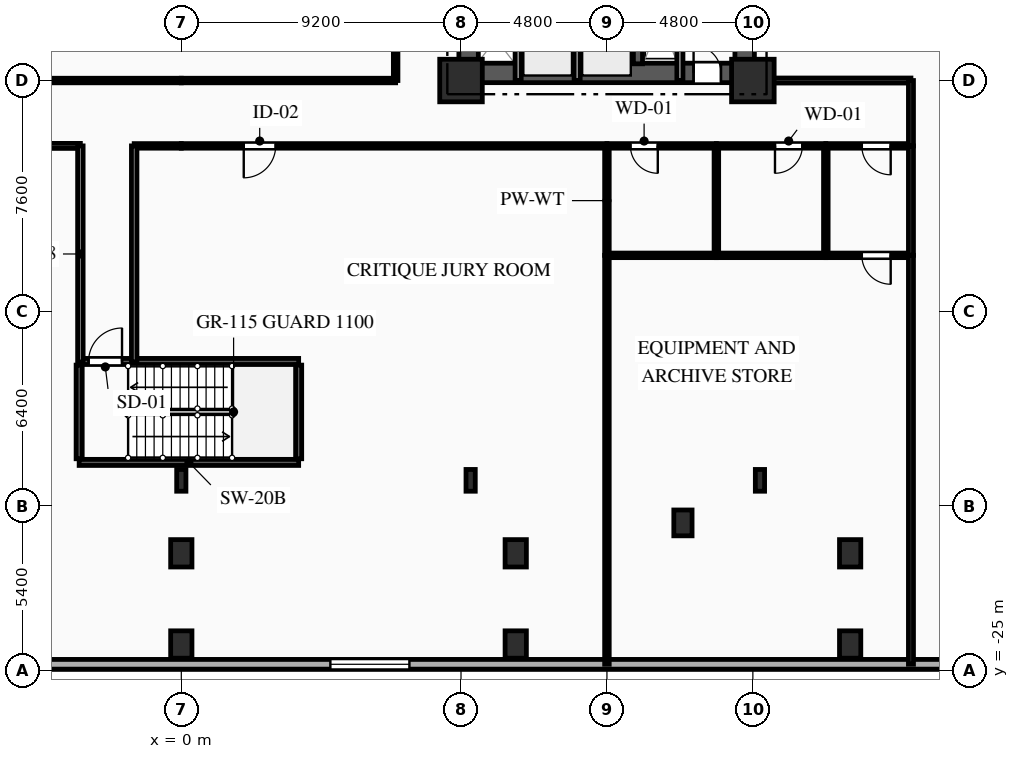
"""IFC4 building model, lengths in metres.
Left out: names, types, materials, properties, quantities, classifications, styles, units other than length and angle.
Written with IfcOpenShell. Run it as: python <this file> out.ifc"""

import sys

from ifc_helpers import new_model, si_unit, direction, frame, frame_2d, origin, origin_2d, place, context, subcontext, project, spatial, rectangle, i_section, extrude, element, fill, save


model = new_model("IFC4")
c1 = context("Model", 3, precision=1e-05, world=origin(), true_north=direction((0.0, 1.0)))
c2 = subcontext(c1, "Body", "Model", "MODEL_VIEW")
j1 = project(units=[si_unit("LENGTHUNIT", "METRE"), si_unit("PLANEANGLEUNIT", "RADIAN")], contexts=[c1])
p1 = place(None, origin())
s1 = spatial("IfcSite", under=j1, at=p1, CompositionType="ELEMENT")
p2 = place(p1, origin())
s2 = spatial("IfcBuilding", under=s1, at=p2, CompositionType="ELEMENT")
p3 = place(p2, frame((0.0, 0.0, 9.0)))
s3 = spatial("IfcBuildingStorey", under=s2, at=p3, CompositionType="ELEMENT", Elevation=9.0)
for number, where, z_axis, x_axis in (
    (1, (9.2, -5.6, 0.0), (0.0, 0.0, 1.0), (1.0, 0.0, 0.0)),
    (2, (18.8, -5.6, 0.0), (0.0, 0.0, 1.0), (1.0, 0.0, 0.0)),
):
    element("IfcColumn", number, at=place(p3, frame(where, z_axis=z_axis, x_axis=x_axis)), inside=s3, PredefinedType="COLUMN", context=c2, shape_type="SweptSolid", body=[
        extrude(rectangle(XDim=1.4, YDim=1.4, at=origin_2d()), origin(), (0.0, 0.0, 1.0), 4.5),
    ])
for number, where, z_axis, x_axis in (
    (3, (0.0, -21.15, 0.0), (0.0, 0.0, 1.0), (1.0, 0.0, 0.0)),
    (4, (11.0, -21.15, 0.0), (0.0, 0.0, 1.0), (1.0, 0.0, 0.0)),
    (5, (22.0, -21.15, 0.0), (0.0, 0.0, 1.0), (1.0, 0.0, 0.0)),
    (6, (0.0, -24.15, 0.0), (0.0, 0.0, 1.0), (1.0, 0.0, 0.0)),
    (7, (11.0, -24.15, 0.0), (0.0, 0.0, 1.0), (1.0, 0.0, 0.0)),
    (8, (22.0, -24.15, 0.0), (0.0, 0.0, 1.0), (1.0, 0.0, 0.0)),
):
    element("IfcColumn", number, at=place(p3, frame(where, z_axis=z_axis, x_axis=x_axis)), inside=s3, PredefinedType="COLUMN", context=c2, shape_type="SweptSolid", body=[
        extrude(rectangle(XDim=0.7, YDim=0.9, at=origin_2d()), origin(), (0.0, 0.0, 1.0), 4.5),
    ])
p4 = place(p3, frame((16.5, -20.15, 0.0), z_axis=(0.0, 0.0, 1.0), x_axis=(1.0, 0.0, 0.0)))
e9 = element("IfcColumn", 9, at=p4, inside=s3, PredefinedType="PILASTER", context=c2, shape_type="SweptSolid", body=[
    extrude(rectangle(XDim=0.6, YDim=0.85, at=origin_2d()), origin(), (0.0, 0.0, 1.0), 4.5),
])
for number, where, z_axis, x_axis in (
    (10, (0.0, -18.75, 0.0), (0.0, 0.0, 1.0), (1.0, 0.0, 0.0)),
    (11, (9.517, -18.75, 0.0), (0.0, 0.0, 1.0), (1.0, 0.0, 0.0)),
    (12, (19.033, -18.75, 0.0), (0.0, 0.0, 1.0), (1.0, 0.0, 0.0)),
):
    element("IfcColumn", number, at=place(p3, frame(where, z_axis=z_axis, x_axis=x_axis)), inside=s3, PredefinedType="COLUMN", context=c2, shape_type="SweptSolid", body=[
        extrude(i_section(OverallWidth=0.304, OverallDepth=0.716, WebThickness=0.021, FlangeThickness=0.04, FilletRadius=0.027, at=origin_2d()), origin(), (0.0, 0.0, 1.0), 4.5),
    ])
p5 = place(p3, frame((38.3, -24.8, 0.0), z_axis=(0.0, 0.0, 1.0), x_axis=(-1.0, 0.0, 0.0)))
e13 = element("IfcWall", 13, at=p5, inside=s3, PredefinedType="SOLIDWALL", context=c2, shape_type="SweptSolid", body=[
    extrude(rectangle(XDim=76.6, YDim=0.32, at=frame_2d((38.3, 0.0))), origin(), (0.0, 0.0, 1.0), 4.17),
])
p6 = place(p5, frame((6.104, 0.0, 0.85)))
e14 = element("IfcOpeningElement", 14, at=p6, cuts=e13, PredefinedType="OPENING", context=c2, shape_type="SweptSolid", body=[
    extrude(rectangle(XDim=2.6, YDim=2.4, at=frame_2d((1.3, 1.2))), frame((0.0, 0.17, 0.0), z_axis=(0.0, -1.0, 0.0), x_axis=(1.0, 0.0, 0.0)), (0.0, 0.0, 1.0), 0.34),
])
p7 = place(p5, frame((30.797, 0.0, 0.85)))
e15 = element("IfcOpeningElement", 15, at=p7, cuts=e13, PredefinedType="OPENING", context=c2, shape_type="SweptSolid", body=[
    extrude(rectangle(XDim=2.6, YDim=2.4, at=frame_2d((1.3, 1.2))), frame((0.0, 0.17, 0.0), z_axis=(0.0, -1.0, 0.0), x_axis=(1.0, 0.0, 0.0)), (0.0, 0.0, 1.0), 0.34),
])
p8 = place(p5, frame((50.687, 0.0, 0.85)))
e16 = element("IfcOpeningElement", 16, at=p8, cuts=e13, PredefinedType="OPENING", context=c2, shape_type="SweptSolid", body=[
    extrude(rectangle(XDim=2.6, YDim=2.4, at=frame_2d((1.3, 1.2))), frame((0.0, 0.17, 0.0), z_axis=(0.0, -1.0, 0.0), x_axis=(1.0, 0.0, 0.0)), (0.0, 0.0, 1.0), 0.34),
])
p9 = place(p5, frame((67.976, 0.0, 0.85)))
e17 = element("IfcOpeningElement", 17, at=p9, cuts=e13, PredefinedType="OPENING", context=c2, shape_type="SweptSolid", body=[
    extrude(rectangle(XDim=2.6, YDim=2.4, at=frame_2d((1.3, 1.2))), frame((0.0, 0.17, 0.0), z_axis=(0.0, -1.0, 0.0), x_axis=(1.0, 0.0, 0.0)), (0.0, 0.0, 1.0), 0.34),
])
p10 = place(p3, frame((9.2, -5.35, 0.0), z_axis=(0.0, 0.0, 1.0), x_axis=(1.0, 0.0, 0.0)))
e18 = element("IfcWall", 18, at=p10, inside=s3, PredefinedType="SHEAR", context=c2, shape_type="SweptSolid", body=[
    extrude(rectangle(XDim=9.6, YDim=0.64, at=frame_2d((4.8, 0.0))), origin(), (0.0, 0.0, 1.0), 4.17),
])
p11 = place(p10, frame((7.65, 0.0, 0.0)))
e19 = element("IfcOpeningElement", 19, at=p11, cuts=e18, PredefinedType="OPENING", context=c2, shape_type="SweptSolid", body=[
    extrude(rectangle(XDim=0.9, YDim=2.1, at=frame_2d((0.45, 1.05))), frame((0.0, 0.33, 0.0), z_axis=(0.0, -1.0, 0.0), x_axis=(1.0, 0.0, 0.0)), (0.0, 0.0, 1.0), 0.66),
])
p12 = place(p3, frame((9.45, -5.05, 0.0), z_axis=(0.0, 0.0, 1.0), x_axis=(0.0, 1.0, 0.0)))
e20 = element("IfcWall", 20, at=p12, inside=s3, PredefinedType="SHEAR", context=c2, shape_type="SweptSolid", body=[
    extrude(rectangle(XDim=10.1, YDim=0.64, at=frame_2d((5.05, 0.0))), origin(), (0.0, 0.0, 1.0), 4.17),
])
p13 = place(p12, frame((7.15, 0.0, 0.0)))
e21 = element("IfcOpeningElement", 21, at=p13, cuts=e20, PredefinedType="OPENING", context=c2, shape_type="SweptSolid", body=[
    extrude(rectangle(XDim=0.9, YDim=2.1, at=frame_2d((0.45, 1.05))), frame((0.0, 0.33, 0.0), z_axis=(0.0, -1.0, 0.0), x_axis=(1.0, 0.0, 0.0)), (0.0, 0.0, 1.0), 0.66),
])
p14 = place(p12, frame((2.4, 0.0, 0.0)))
e22 = element("IfcOpeningElement", 22, at=p14, cuts=e20, PredefinedType="OPENING", context=c2, shape_type="SweptSolid", body=[
    extrude(rectangle(XDim=1.2, YDim=2.15, at=frame_2d((0.6, 1.075))), frame((0.0, 0.33, 0.0), z_axis=(0.0, -1.0, 0.0), x_axis=(1.0, 0.0, 0.0)), (0.0, 0.0, 1.0), 0.66),
])
p15 = place(p3, frame((18.53, -5.05, 0.0), z_axis=(0.0, 0.0, 1.0), x_axis=(0.0, 1.0, 0.0)))
e23 = element("IfcWall", 23, at=p15, inside=s3, PredefinedType="SHEAR", context=c2, shape_type="SweptSolid", body=[
    extrude(rectangle(XDim=10.1, YDim=0.64, at=frame_2d((5.05, 0.0))), origin(), (0.0, 0.0, 1.0), 4.17),
])
p16 = place(p3, frame((15.02, -5.05, 0.0), z_axis=(0.0, 0.0, 1.0), x_axis=(0.0, 1.0, 0.0)))
e24 = element("IfcWall", 24, at=p16, inside=s3, PredefinedType="SHEAR", context=c2, shape_type="SweptSolid", body=[
    extrude(rectangle(XDim=10.1, YDim=0.3, at=frame_2d((5.05, 0.0))), origin(), (0.0, 0.0, 1.0), 4.17),
])
p17 = place(p3, frame((-3.36, -14.84, 0.0), z_axis=(0.0, 0.0, 1.0), x_axis=(1.0, 0.0, 0.0)))
e25 = element("IfcWall", 25, at=p17, inside=s3, PredefinedType="SHEAR", context=c2, shape_type="SweptSolid", body=[
    extrude(rectangle(XDim=7.22, YDim=0.2, at=frame_2d((3.61, 0.0))), origin(), (0.0, 0.0, 1.0), 4.17),
])
p18 = place(p17, frame((0.31, 0.0, 0.0)))
e26 = element("IfcOpeningElement", 26, at=p18, cuts=e25, PredefinedType="OPENING", context=c2, shape_type="SweptSolid", body=[
    extrude(rectangle(XDim=1.1, YDim=2.15, at=frame_2d((0.55, 1.075))), frame((0.0, 0.11, 0.0), z_axis=(0.0, -1.0, 0.0), x_axis=(1.0, 0.0, 0.0)), (0.0, 0.0, 1.0), 0.22),
])
p19 = place(p3, frame((-3.36, -18.16, 0.0), z_axis=(0.0, 0.0, 1.0), x_axis=(1.0, 0.0, 0.0)))
e27 = element("IfcWall", 27, at=p19, inside=s3, PredefinedType="SHEAR", context=c2, shape_type="SweptSolid", body=[
    extrude(rectangle(XDim=7.22, YDim=0.2, at=frame_2d((3.61, 0.0))), origin(), (0.0, 0.0, 1.0), 4.17),
])
for number, where, z_axis, x_axis in (
    (28, (-3.36, -18.04, 0.0), (0.0, 0.0, 1.0), (0.0, 1.0, 0.0)),
    (29, (3.86, -18.04, 0.0), (0.0, 0.0, 1.0), (0.0, 1.0, 0.0)),
):
    element("IfcWall", number, at=place(p3, frame(where, z_axis=z_axis, x_axis=x_axis)), inside=s3, PredefinedType="SHEAR", context=c2, shape_type="SweptSolid", body=[
        extrude(rectangle(XDim=3.08, YDim=0.2, at=frame_2d((1.54, 0.0))), origin(), (0.0, 0.0, 1.0), 4.17),
    ])
p20 = place(p3, frame((16.4, -2.11, 0.0), z_axis=(0.0, 0.0, 1.0), x_axis=(0.0, -1.0, 0.0)))
e30 = element("IfcWall", 30, at=p20, inside=s3, PredefinedType="PARTITIONING", context=c2, shape_type="SweptSolid", body=[
    extrude(rectangle(XDim=3.49, YDim=0.2, at=frame_2d((1.745, 0.0))), origin(), (0.0, 0.0, 1.0), 4.17),
])
for number, where, z_axis, x_axis in (
    (31, (11.08, -5.6, 0.0), (0.0, 0.0, 1.0), (0.0, 1.0, 0.0)),
    (32, (13.02, -5.6, 0.0), (0.0, 0.0, 1.0), (0.0, 1.0, 0.0)),
):
    element("IfcWall", number, at=place(p3, frame(where, z_axis=z_axis, x_axis=x_axis)), inside=s3, PredefinedType="PARTITIONING", context=c2, shape_type="SweptSolid", body=[
        extrude(rectangle(XDim=2.25, YDim=0.2, at=frame_2d((1.125, 0.0))), origin(), (0.0, 0.0, 1.0), 4.17),
    ])
p21 = place(p3, frame((-3.32, -7.75, 0.0), z_axis=(0.0, 0.0, 1.0), x_axis=(-1.0, 0.0, 0.0)))
e33 = element("IfcWall", 33, at=p21, inside=s3, PredefinedType="PARTITIONING", context=c2, shape_type="SweptSolid", body=[
    extrude(rectangle(XDim=20.68, YDim=0.165, at=frame_2d((10.34, 0.0))), origin(), (0.0, 0.0, 1.0), 4.17),
])
p22 = place(p21, frame((9.64, 0.0, 0.0)))
e34 = element("IfcOpeningElement", 34, at=p22, cuts=e33, PredefinedType="OPENING", context=c2, shape_type="SweptSolid", body=[
    extrude(rectangle(XDim=1.4, YDim=2.3, at=frame_2d((0.7, 1.15))), frame((0.0, 0.093, 0.0), z_axis=(0.0, -1.0, 0.0), x_axis=(1.0, 0.0, 0.0)), (0.0, 0.0, 1.0), 0.185),
])
p23 = place(p3, frame((0.0, -7.75, 0.0), z_axis=(0.0, 0.0, 1.0), x_axis=(-1.0, 0.0, 0.0)))
e35 = element("IfcWall", 35, at=p23, inside=s3, PredefinedType="PARTITIONING", context=c2, shape_type="SweptSolid", body=[
    extrude(rectangle(XDim=1.55, YDim=0.15, at=frame_2d((0.775, 0.0))), origin(), (0.0, 0.0, 1.0), 4.17),
])
p24 = place(p3, frame((-7.05, -5.6, 0.0), z_axis=(0.0, 0.0, 1.0), x_axis=(1.0, 0.0, 0.0)))
e36 = element("IfcWall", 36, at=p24, inside=s3, PredefinedType="PARTITIONING", context=c2, shape_type="SweptSolid", body=[
    extrude(rectangle(XDim=7.05, YDim=0.15, at=frame_2d((3.525, 0.0))), origin(), (0.0, 0.0, 1.0), 3.147),
])
p25 = place(p3, frame((14.0, -7.75, 0.0), z_axis=(0.0, 0.0, 1.0), x_axis=(-1.0, 0.0, 0.0)))
e37 = element("IfcWall", 37, at=p25, inside=s3, PredefinedType="PARTITIONING", context=c2, shape_type="SweptSolid", body=[
    extrude(rectangle(XDim=14.0, YDim=0.15, at=frame_2d((7.0, 0.0))), origin(), (0.0, 0.0, 1.0), 4.17),
])
p26 = place(p25, frame((10.896, 0.0, 0.0)))
e38 = element("IfcOpeningElement", 38, at=p26, cuts=e37, PredefinedType="OPENING", context=c2, shape_type="SweptSolid", body=[
    extrude(rectangle(XDim=1.05, YDim=2.15, at=frame_2d((0.525, 1.075))), frame((0.0, 0.085, 0.0), z_axis=(0.0, -1.0, 0.0), x_axis=(1.0, 0.0, 0.0)), (0.0, 0.0, 1.0), 0.17),
])
p27 = place(p3, frame((17.6, -7.75, 0.0), z_axis=(0.0, 0.0, 1.0), x_axis=(-1.0, 0.0, 0.0)))
e39 = element("IfcWall", 39, at=p27, inside=s3, PredefinedType="PLUMBINGWALL", context=c2, shape_type="SweptSolid", body=[
    extrude(rectangle(XDim=3.6, YDim=0.15, at=frame_2d((1.8, 0.0))), origin(), (0.0, 0.0, 1.0), 4.17),
])
p28 = place(p27, frame((1.927, 0.0, 0.0)))
e40 = element("IfcOpeningElement", 40, at=p28, cuts=e39, PredefinedType="OPENING", context=c2, shape_type="SweptSolid", body=[
    extrude(rectangle(XDim=0.9, YDim=2.1, at=frame_2d((0.45, 1.05))), frame((0.0, 0.085, 0.0), z_axis=(0.0, -1.0, 0.0), x_axis=(1.0, 0.0, 0.0)), (0.0, 0.0, 1.0), 0.17),
])
p29 = place(p3, frame((21.2, -7.75, 0.0), z_axis=(0.0, 0.0, 1.0), x_axis=(-1.0, 0.0, 0.0)))
e41 = element("IfcWall", 41, at=p29, inside=s3, PredefinedType="PLUMBINGWALL", context=c2, shape_type="SweptSolid", body=[
    extrude(rectangle(XDim=3.6, YDim=0.15, at=frame_2d((1.8, 0.0))), origin(), (0.0, 0.0, 1.0), 4.17),
])
p30 = place(p29, frame((0.772, 0.0, 0.0)))
e42 = element("IfcOpeningElement", 42, at=p30, cuts=e41, PredefinedType="OPENING", context=c2, shape_type="SweptSolid", body=[
    extrude(rectangle(XDim=0.9, YDim=2.1, at=frame_2d((0.45, 1.05))), frame((0.0, 0.085, 0.0), z_axis=(0.0, -1.0, 0.0), x_axis=(1.0, 0.0, 0.0)), (0.0, 0.0, 1.0), 0.17),
])
p31 = place(p3, frame((24.0, -7.75, 0.0), z_axis=(0.0, 0.0, 1.0), x_axis=(-1.0, 0.0, 0.0)))
e43 = element("IfcWall", 43, at=p31, inside=s3, PredefinedType="PARTITIONING", context=c2, shape_type="SweptSolid", body=[
    extrude(rectangle(XDim=2.8, YDim=0.15, at=frame_2d((1.4, 0.0))), origin(), (0.0, 0.0, 1.0), 4.17),
])
p32 = place(p31, frame((0.666, 0.0, 0.0)))
e44 = element("IfcOpeningElement", 44, at=p32, cuts=e43, PredefinedType="OPENING", context=c2, shape_type="SweptSolid", body=[
    extrude(rectangle(XDim=0.95, YDim=2.1, at=frame_2d((0.475, 1.05))), frame((0.0, 0.085, 0.0), z_axis=(0.0, -1.0, 0.0), x_axis=(1.0, 0.0, 0.0)), (0.0, 0.0, 1.0), 0.17),
])
p33 = place(p3, frame((0.0, -5.6, 0.0), z_axis=(0.0, 0.0, 1.0), x_axis=(1.0, 0.0, 0.0)))
e45 = element("IfcWall", 45, at=p33, inside=s3, PredefinedType="PARTITIONING", context=c2, shape_type="SweptSolid", body=[
    extrude(rectangle(XDim=7.05, YDim=0.15, at=frame_2d((3.525, 0.0))), origin(), (0.0, 0.0, 1.0), 3.147),
])
p34 = place(p3, frame((18.8, -5.6, 0.0), z_axis=(0.0, 0.0, 1.0), x_axis=(1.0, 0.0, 0.0)))
e46 = element("IfcWall", 46, at=p34, inside=s3, PredefinedType="PARTITIONING", context=c2, shape_type="SweptSolid", body=[
    extrude(rectangle(XDim=5.2, YDim=0.165, at=frame_2d((2.6, 0.0))), origin(), (0.0, 0.0, 1.0), 4.17),
])
p35 = place(p3, frame((24.0, -5.6, 0.0), z_axis=(0.0, 0.0, 1.0), x_axis=(0.0, -1.0, 0.0)))
e47 = element("IfcWall", 47, at=p35, inside=s3, PredefinedType="PARTITIONING", context=c2, shape_type="SweptSolid", body=[
    extrude(rectangle(XDim=2.15, YDim=0.165, at=frame_2d((1.075, 0.0))), origin(), (0.0, 0.0, 1.0), 4.17),
])
p36 = place(p3, frame((7.05, -5.6, 0.0), z_axis=(0.0, 0.0, 1.0), x_axis=(0.0, 1.0, 0.0)))
e48 = element("IfcWall", 48, at=p36, inside=s3, PredefinedType="PARTITIONING", context=c2, shape_type="SweptSolid", body=[
    extrude(rectangle(XDim=14.1, YDim=0.15, at=frame_2d((7.05, 0.0))), origin(), (0.0, 0.0, 1.0), 4.17),
])
for number, where, z_axis, x_axis in (
    (49, (-3.32, -14.86, 0.0), (0.0, 0.0, 1.0), (0.0, 1.0, 0.0)),
    (50, (-1.55, -7.75, 0.0), (0.0, 0.0, 1.0), (0.0, -1.0, 0.0)),
):
    element("IfcWall", number, at=place(p3, frame(where, z_axis=z_axis, x_axis=x_axis)), inside=s3, PredefinedType="PARTITIONING", context=c2, shape_type="SweptSolid", body=[
        extrude(rectangle(XDim=7.11, YDim=0.18, at=frame_2d((3.555, 0.0))), origin(), (0.0, 0.0, 1.0), 4.17),
    ])
p37 = place(p3, frame((14.0, -7.75, 0.0), z_axis=(0.0, 0.0, 1.0), x_axis=(0.0, -1.0, 0.0)))
e51 = element("IfcWall", 51, at=p37, inside=s3, PredefinedType="PLUMBINGWALL", context=c2, shape_type="SweptSolid", body=[
    extrude(rectangle(XDim=3.6, YDim=0.15, at=frame_2d((1.8, 0.0))), origin(), (0.0, 0.0, 1.0), 4.17),
])
p38 = place(p3, frame((14.0, -11.35, 0.0), z_axis=(0.0, 0.0, 1.0), x_axis=(0.0, -1.0, 0.0)))
e52 = element("IfcWall", 52, at=p38, inside=s3, PredefinedType="PARTITIONING", context=c2, shape_type="SweptSolid", body=[
    extrude(rectangle(XDim=13.45, YDim=0.15, at=frame_2d((6.725, 0.0))), origin(), (0.0, 0.0, 1.0), 4.17),
])
for number, where, z_axis, x_axis in (
    (53, (17.6, -7.75, 0.0), (0.0, 0.0, 1.0), (0.0, -1.0, 0.0)),
    (54, (17.6, -11.35, 0.0), (0.0, 0.0, 1.0), (-1.0, 0.0, 0.0)),
    (55, (21.2, -7.75, 0.0), (0.0, 0.0, 1.0), (0.0, -1.0, 0.0)),
):
    element("IfcWall", number, at=place(p3, frame(where, z_axis=z_axis, x_axis=x_axis)), inside=s3, PredefinedType="PLUMBINGWALL", context=c2, shape_type="SweptSolid", body=[
        extrude(rectangle(XDim=3.6, YDim=0.15, at=frame_2d((1.8, 0.0))), origin(), (0.0, 0.0, 1.0), 4.17),
    ])
p39 = place(p3, frame((21.2, -11.35, 0.0), z_axis=(0.0, 0.0, 1.0), x_axis=(-1.0, 0.0, 0.0)))
e56 = element("IfcWall", 56, at=p39, inside=s3, PredefinedType="PLUMBINGWALL", context=c2, shape_type="SweptSolid", body=[
    extrude(rectangle(XDim=3.6, YDim=0.15, at=frame_2d((1.8, 0.0))), origin(), (0.0, 0.0, 1.0), 4.17),
])
p40 = place(p3, frame((24.0, -11.35, 0.0), z_axis=(0.0, 0.0, 1.0), x_axis=(-1.0, 0.0, 0.0)))
e57 = element("IfcWall", 57, at=p40, inside=s3, PredefinedType="PARTITIONING", context=c2, shape_type="SweptSolid", body=[
    extrude(rectangle(XDim=2.8, YDim=0.15, at=frame_2d((1.4, 0.0))), origin(), (0.0, 0.0, 1.0), 4.17),
])
p41 = place(p40, frame((0.666, 0.0, 0.0)))
e58 = element("IfcOpeningElement", 58, at=p41, cuts=e57, PredefinedType="OPENING", context=c2, shape_type="SweptSolid", body=[
    extrude(rectangle(XDim=0.95, YDim=2.1, at=frame_2d((0.475, 1.05))), frame((0.0, 0.085, 0.0), z_axis=(0.0, -1.0, 0.0), x_axis=(1.0, 0.0, 0.0)), (0.0, 0.0, 1.0), 0.17),
])
p42 = place(p3, frame((24.0, -7.75, 0.0), z_axis=(0.0, 0.0, 1.0), x_axis=(0.0, -1.0, 0.0)))
e59 = element("IfcWall", 59, at=p42, inside=s3, PredefinedType="PARTITIONING", context=c2, shape_type="SweptSolid", body=[
    extrude(rectangle(XDim=3.6, YDim=0.165, at=frame_2d((1.8, 0.0))), origin(), (0.0, 0.0, 1.0), 4.17),
])
p43 = place(p3, frame((24.0, -11.35, 0.0), z_axis=(0.0, 0.0, 1.0), x_axis=(0.0, -1.0, 0.0)))
e60 = element("IfcWall", 60, at=p43, inside=s3, PredefinedType="PARTITIONING", context=c2, shape_type="SweptSolid", body=[
    extrude(rectangle(XDim=13.45, YDim=0.165, at=frame_2d((6.725, 0.0))), origin(), (0.0, 0.0, 1.0), 4.17),
])
p44 = place(p7, origin())
e61 = element("IfcWindow", 61, at=p44, inside=s3, PartitioningType="SINGLE_PANEL", PredefinedType="WINDOW", context=c2, shape_type="SweptSolid", body=[
    extrude(rectangle(XDim=2.6, YDim=2.4, at=frame_2d((1.3, 1.2))), frame((0.0, 0.03, 0.0), z_axis=(0.0, -1.0, 0.0), x_axis=(1.0, 0.0, 0.0)), (0.0, 0.0, 1.0), 0.06),
])
fill(e15, e61)
p45 = place(p11, origin())
e62 = element("IfcDoor", 62, at=p45, inside=s3, OperationType="SINGLE_SWING_LEFT", PredefinedType="DOOR", context=c2, shape_type="SweptSolid", body=[
    extrude(rectangle(XDim=0.9, YDim=2.1, at=frame_2d((0.45, 1.05))), frame((0.0, 0.025, 0.0), z_axis=(0.0, -1.0, 0.0), x_axis=(1.0, 0.0, 0.0)), (0.0, 0.0, 1.0), 0.05),
])
fill(e19, e62)
p46 = place(p18, origin())
e63 = element("IfcDoor", 63, at=p46, inside=s3, OperationType="SINGLE_SWING_RIGHT", PredefinedType="DOOR", context=c2, shape_type="SweptSolid", body=[
    extrude(rectangle(XDim=1.1, YDim=2.15, at=frame_2d((0.55, 1.075))), frame((0.0, 0.025, 0.0), z_axis=(0.0, -1.0, 0.0), x_axis=(1.0, 0.0, 0.0)), (0.0, 0.0, 1.0), 0.05),
])
fill(e26, e63)
p47 = place(p26, origin())
e64 = element("IfcDoor", 64, at=p47, inside=s3, OperationType="SINGLE_SWING_RIGHT", PredefinedType="DOOR", context=c2, shape_type="SweptSolid", body=[
    extrude(rectangle(XDim=1.05, YDim=2.15, at=frame_2d((0.525, 1.075))), frame((0.0, 0.025, 0.0), z_axis=(0.0, -1.0, 0.0), x_axis=(1.0, 0.0, 0.0)), (0.0, 0.0, 1.0), 0.05),
])
fill(e38, e64)
p48 = place(p28, origin())
e65 = element("IfcDoor", 65, at=p48, inside=s3, OperationType="SINGLE_SWING_LEFT", PredefinedType="DOOR", context=c2, shape_type="SweptSolid", body=[
    extrude(rectangle(XDim=0.9, YDim=2.1, at=frame_2d((0.45, 1.05))), frame((0.0, 0.025, 0.0), z_axis=(0.0, -1.0, 0.0), x_axis=(1.0, 0.0, 0.0)), (0.0, 0.0, 1.0), 0.05),
])
fill(e40, e65)
p49 = place(p30, origin())
e66 = element("IfcDoor", 66, at=p49, inside=s3, OperationType="SINGLE_SWING_RIGHT", PredefinedType="DOOR", context=c2, shape_type="SweptSolid", body=[
    extrude(rectangle(XDim=0.9, YDim=2.1, at=frame_2d((0.45, 1.05))), frame((0.0, 0.025, 0.0), z_axis=(0.0, -1.0, 0.0), x_axis=(1.0, 0.0, 0.0)), (0.0, 0.0, 1.0), 0.05),
])
fill(e42, e66)
p50 = place(p32, origin())
e67 = element("IfcDoor", 67, at=p50, inside=s3, OperationType="SINGLE_SWING_LEFT", PredefinedType="DOOR", context=c2, shape_type="SweptSolid", body=[
    extrude(rectangle(XDim=0.95, YDim=2.1, at=frame_2d((0.475, 1.05))), frame((0.0, 0.025, 0.0), z_axis=(0.0, -1.0, 0.0), x_axis=(1.0, 0.0, 0.0)), (0.0, 0.0, 1.0), 0.05),
])
fill(e44, e67)
p51 = place(p41, origin())
e68 = element("IfcDoor", 68, at=p51, inside=s3, OperationType="SINGLE_SWING_LEFT", PredefinedType="DOOR", context=c2, shape_type="SweptSolid", body=[
    extrude(rectangle(XDim=0.95, YDim=2.1, at=frame_2d((0.475, 1.05))), frame((0.0, 0.025, 0.0), z_axis=(0.0, -1.0, 0.0), x_axis=(1.0, 0.0, 0.0)), (0.0, 0.0, 1.0), 0.05),
])
fill(e58, e68)
save(model, sys.argv[1])
